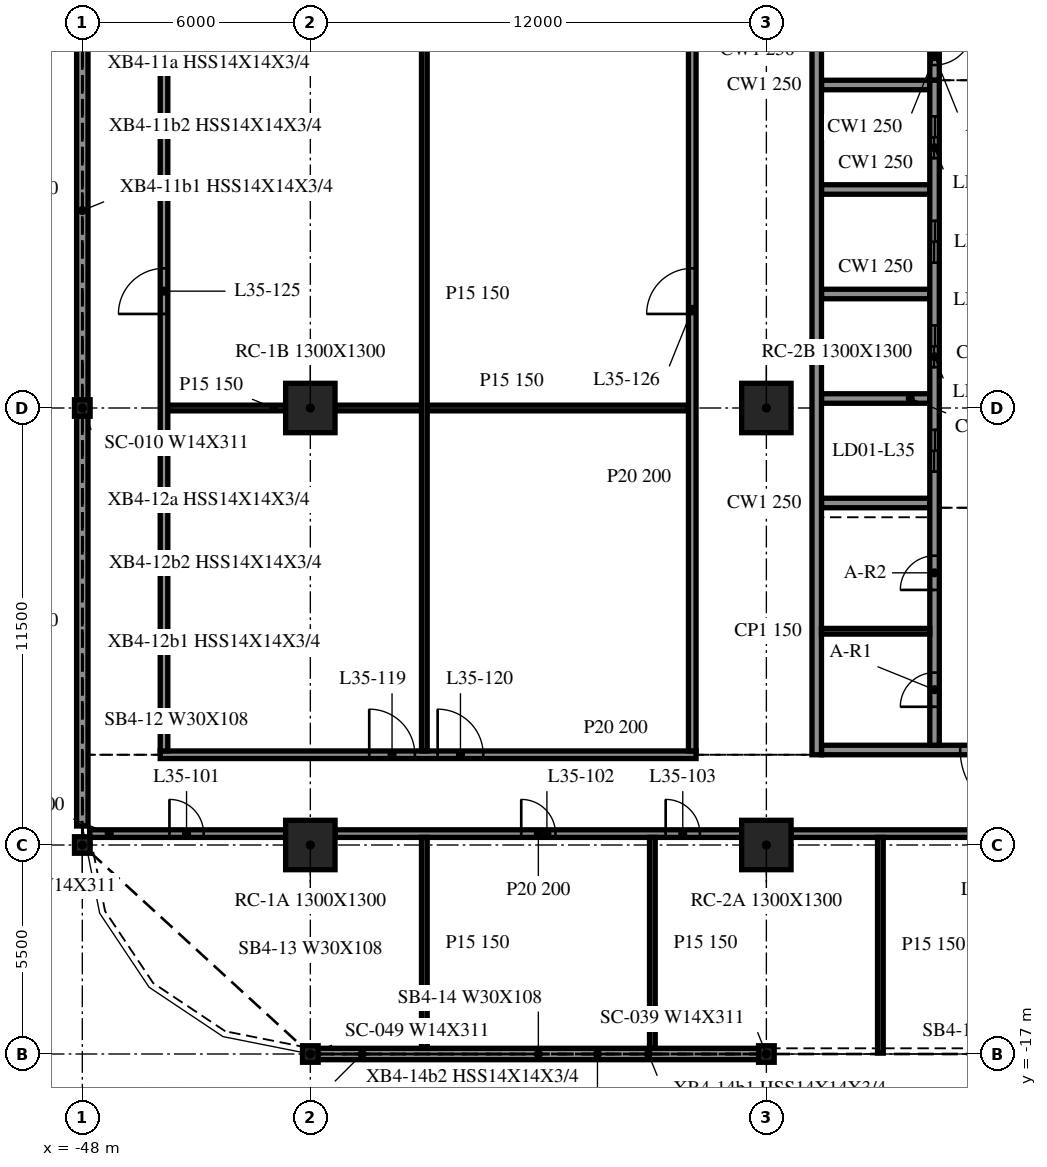
"""IFC4 building model, lengths in metres.
Left out: names, types, materials, properties, quantities, classifications, styles, units other than length and angle.
Written with IfcOpenShell. Run it as: python <this file> out.ifc"""

import sys

from ifc_helpers import new_model, si_unit, direction, frame, frame_2d, origin, origin_2d, place, context, subcontext, project, spatial, rectangle, i_section, extrude, element, fill, save


model = new_model("IFC4")
c1 = context("Model", 3, precision=1e-05, world=origin(), true_north=direction((0.0, 1.0)))
c2 = subcontext(c1, "Body", "Model", "MODEL_VIEW")
j1 = project(units=[si_unit("LENGTHUNIT", "METRE"), si_unit("PLANEANGLEUNIT", "RADIAN")], contexts=[c1])
p1 = place(None, origin())
s1 = spatial("IfcSite", under=j1, at=p1, CompositionType="ELEMENT")
p2 = place(p1, origin())
s2 = spatial("IfcBuilding", under=s1, at=p2, CompositionType="ELEMENT")
p3 = place(p2, frame((0.0, 0.0, 150.7)))
s3 = spatial("IfcBuildingStorey", under=s2, at=p3, CompositionType="ELEMENT", Elevation=150.7)
for number, where, z_axis, x_axis in (
    (1, (-42.0, -11.5, -0.34), (0.0, 0.0, 1.0), (1.0, 0.0, 0.0)),
    (2, (-42.0, 0.0, -0.34), (0.0, 0.0, 1.0), (1.0, 0.0, 0.0)),
    (3, (-30.0, -11.5, -0.34), (0.0, 0.0, 1.0), (1.0, 0.0, 0.0)),
    (4, (-30.0, 0.0, -0.34), (0.0, 0.0, 1.0), (1.0, 0.0, 0.0)),
):
    element("IfcColumn", number, at=place(p3, frame(where, z_axis=z_axis, x_axis=x_axis)), inside=s3, PredefinedType="COLUMN", context=c2, shape_type="SweptSolid", body=[
        extrude(rectangle(XDim=1.3, YDim=1.3, at=origin_2d()), origin(), (0.0, 0.0, 1.0), 3.89),
    ])
for number, where, z_axis, x_axis in (
    (5, (-48.0, 0.0, -0.34), (0.0, 0.0, 1.0), (1.0, 0.0, 0.0)),
    (6, (-48.0, -11.5, -0.34), (0.0, 0.0, 1.0), (1.0, 0.0, 0.0)),
    (7, (-42.0, -17.0, -0.34), (0.0, 0.0, 1.0), (1.0, 0.0, 0.0)),
    (8, (-30.0, -17.0, -0.34), (0.0, 0.0, 1.0), (1.0, 0.0, 0.0)),
):
    element("IfcColumn", number, at=place(p3, frame(where, z_axis=z_axis, x_axis=x_axis)), inside=s3, PredefinedType="COLUMN", context=c2, shape_type="SweptSolid", body=[
        extrude(i_section(OverallWidth=0.412, OverallDepth=0.434, WebThickness=0.036, FlangeThickness=0.057, at=origin_2d()), origin(), (0.0, 0.0, 1.0), 3.89),
    ])
p4 = place(p3, frame((-48.0, 11.282, 0.0), z_axis=(0.0, 0.0, 1.0), x_axis=(0.0, -1.0, 0.0)))
e9 = element("IfcWall", 9, at=p4, inside=s3, PredefinedType="NOTDEFINED", context=c2, shape_type="SweptSolid", body=[
    extrude(rectangle(XDim=11.064, YDim=0.3, at=frame_2d((5.532, 0.0))), origin(), (0.0, 0.0, 1.0), 3.55),
])
p5 = place(p3, frame((-48.0, -0.218, 0.0), z_axis=(0.0, 0.0, 1.0), x_axis=(0.0, -1.0, 0.0)))
e10 = element("IfcWall", 10, at=p5, inside=s3, PredefinedType="NOTDEFINED", context=c2, shape_type="SweptSolid", body=[
    extrude(rectangle(XDim=10.782, YDim=0.3, at=frame_2d((5.391, 0.0))), origin(), (0.0, 0.0, 1.0), 3.55),
])
p6 = place(p3, frame((-41.982, -17.0, 0.0), z_axis=(0.0, 0.0, 1.0), x_axis=(1.0, 0.0, 0.0)))
e11 = element("IfcWall", 11, at=p6, inside=s3, PredefinedType="NOTDEFINED", context=c2, shape_type="SweptSolid", body=[
    extrude(rectangle(XDim=11.964, YDim=0.3, at=frame_2d((5.982, 0.0))), origin(), (0.0, 0.0, 1.0), 3.55),
])
p7 = place(p3, frame((-28.675, 15.125, 0.0), z_axis=(0.0, 0.0, 1.0), x_axis=(0.0, -1.0, 0.0)))
e12 = element("IfcWall", 12, at=p7, inside=s3, PredefinedType="SOLIDWALL", context=c2, shape_type="SweptSolid", body=[
    extrude(rectangle(XDim=24.25, YDim=0.25, at=frame_2d((12.125, 0.0))), origin(), (0.0, 0.0, 1.0), 3.55),
])
p8 = place(p3, frame((-19.45, -9.0, 0.0), z_axis=(0.0, 0.0, 1.0), x_axis=(-1.0, 0.0, 0.0)))
e13 = element("IfcWall", 13, at=p8, inside=s3, PredefinedType="SOLIDWALL", context=c2, shape_type="SweptSolid", body=[
    extrude(rectangle(XDim=9.1, YDim=0.25, at=frame_2d((4.55, 0.0))), origin(), (0.0, 0.0, 1.0), 3.55),
])
p9 = place(p8, frame((3.65, 0.0, 0.0)))
e14 = element("IfcOpeningElement", 14, at=p9, cuts=e13, PredefinedType="OPENING", context=c2, shape_type="SweptSolid", body=[
    extrude(rectangle(XDim=1.8, YDim=2.1, at=frame_2d((0.9, 1.05))), frame((0.0, 0.135, 0.0), z_axis=(0.0, -1.0, 0.0), x_axis=(1.0, 0.0, 0.0)), (0.0, 0.0, 1.0), 0.27),
])
p10 = place(p3, frame((-25.575, -8.875, 0.0), z_axis=(0.0, 0.0, 1.0), x_axis=(0.0, 1.0, 0.0)))
e15 = element("IfcWall", 15, at=p10, inside=s3, PredefinedType="SOLIDWALL", context=c2, shape_type="SweptSolid", body=[
    extrude(rectangle(XDim=17.5, YDim=0.25, at=frame_2d((8.75, 0.0))), origin(), (0.0, 0.0, 1.0), 3.55),
])
p11 = place(p10, frame((7.2, 0.0, 0.0)))
e16 = element("IfcOpeningElement", 16, at=p11, cuts=e15, PredefinedType="OPENING", context=c2, shape_type="SweptSolid", body=[
    extrude(rectangle(XDim=1.1, YDim=2.1, at=frame_2d((0.55, 1.05))), frame((0.0, 0.135, 0.0), z_axis=(0.0, -1.0, 0.0), x_axis=(1.0, 0.0, 0.0)), (0.0, 0.0, 1.0), 0.27),
])
p12 = place(p10, frame((9.95, 0.0, 0.0)))
e17 = element("IfcOpeningElement", 17, at=p12, cuts=e15, PredefinedType="OPENING", context=c2, shape_type="SweptSolid", body=[
    extrude(rectangle(XDim=1.1, YDim=2.1, at=frame_2d((0.55, 1.05))), frame((0.0, 0.135, 0.0), z_axis=(0.0, -1.0, 0.0), x_axis=(1.0, 0.0, 0.0)), (0.0, 0.0, 1.0), 0.27),
])
p13 = place(p10, frame((12.7, 0.0, 0.0)))
e18 = element("IfcOpeningElement", 18, at=p13, cuts=e15, PredefinedType="OPENING", context=c2, shape_type="SweptSolid", body=[
    extrude(rectangle(XDim=1.1, YDim=2.1, at=frame_2d((0.55, 1.05))), frame((0.0, 0.135, 0.0), z_axis=(0.0, -1.0, 0.0), x_axis=(1.0, 0.0, 0.0)), (0.0, 0.0, 1.0), 0.27),
])
p14 = place(p10, frame((15.45, 0.0, 0.0)))
e19 = element("IfcOpeningElement", 19, at=p14, cuts=e15, PredefinedType="OPENING", context=c2, shape_type="SweptSolid", body=[
    extrude(rectangle(XDim=1.1, YDim=2.1, at=frame_2d((0.55, 1.05))), frame((0.0, 0.135, 0.0), z_axis=(0.0, -1.0, 0.0), x_axis=(1.0, 0.0, 0.0)), (0.0, 0.0, 1.0), 0.27),
])
p15 = place(p10, frame((1.012, 0.0, 0.0)))
e20 = element("IfcOpeningElement", 20, at=p15, cuts=e15, PredefinedType="OPENING", context=c2, shape_type="SweptSolid", body=[
    extrude(rectangle(XDim=0.9, YDim=2.1, at=frame_2d((0.45, 1.05))), frame((0.0, 0.135, 0.0), z_axis=(0.0, -1.0, 0.0), x_axis=(1.0, 0.0, 0.0)), (0.0, 0.0, 1.0), 0.27),
])
p16 = place(p10, frame((4.087, 0.0, 0.0)))
e21 = element("IfcOpeningElement", 21, at=p16, cuts=e15, PredefinedType="OPENING", context=c2, shape_type="SweptSolid", body=[
    extrude(rectangle(XDim=0.9, YDim=2.1, at=frame_2d((0.45, 1.05))), frame((0.0, 0.135, 0.0), z_axis=(0.0, -1.0, 0.0), x_axis=(1.0, 0.0, 0.0)), (0.0, 0.0, 1.0), 0.27),
])
p17 = place(p3, frame((-25.575, 14.875, 0.0), z_axis=(0.0, 0.0, 1.0), x_axis=(0.0, -1.0, 0.0)))
e22 = element("IfcWall", 22, at=p17, inside=s3, PredefinedType="SOLIDWALL", context=c2, shape_type="SweptSolid", body=[
    extrude(rectangle(XDim=6.25, YDim=0.25, at=frame_2d((3.125, 0.0))), origin(), (0.0, 0.0, 1.0), 3.55),
])
p18 = place(p17, frame((4.85, 0.0, 0.0)))
e23 = element("IfcOpeningElement", 23, at=p18, cuts=e22, PredefinedType="OPENING", context=c2, shape_type="SweptSolid", body=[
    extrude(rectangle(XDim=1.0, YDim=2.1, at=frame_2d((0.5, 1.05))), frame((0.0, 0.135, 0.0), z_axis=(0.0, -1.0, 0.0), x_axis=(1.0, 0.0, 0.0)), (0.0, 0.0, 1.0), 0.27),
])
for number, where, z_axis, x_axis in (
    (24, (-28.55, -2.5, 0.0), (0.0, 0.0, 1.0), (1.0, 0.0, 0.0)),
    (25, (-28.55, 0.25, 0.0), (0.0, 0.0, 1.0), (1.0, 0.0, 0.0)),
    (26, (-28.55, 3.0, 0.0), (0.0, 0.0, 1.0), (1.0, 0.0, 0.0)),
    (27, (-28.55, 5.75, 0.0), (0.0, 0.0, 1.0), (1.0, 0.0, 0.0)),
    (28, (-28.55, 8.5, 0.0), (0.0, 0.0, 1.0), (1.0, 0.0, 0.0)),
):
    element("IfcWall", number, at=place(p3, frame(where, z_axis=z_axis, x_axis=x_axis)), inside=s3, PredefinedType="SOLIDWALL", context=c2, shape_type="SweptSolid", body=[
        extrude(rectangle(XDim=2.85, YDim=0.25, at=frame_2d((1.425, 0.0))), origin(), (0.0, 0.0, 1.0), 3.55),
    ])
p19 = place(p3, frame((-28.55, -5.875, 0.0), z_axis=(0.0, 0.0, 1.0), x_axis=(1.0, 0.0, 0.0)))
e29 = element("IfcWall", 29, at=p19, inside=s3, PredefinedType="PARTITIONING", context=c2, shape_type="SweptSolid", body=[
    extrude(rectangle(XDim=2.85, YDim=0.15, at=frame_2d((1.425, 0.0))), origin(), (0.0, 0.0, 1.0), 3.55),
])
p20 = place(p3, frame((-47.807, -11.2, 0.0), z_axis=(0.0, 0.0, 1.0), x_axis=(1.0, 0.0, 0.0)))
e30 = element("IfcWall", 30, at=p20, inside=s3, PredefinedType="PARTITIONING", context=c2, shape_type="SweptSolid", body=[
    extrude(rectangle(XDim=5.157, YDim=0.2, at=frame_2d((2.579, 0.0))), origin(), (0.0, 0.0, 1.0), 3.55),
])
p21 = place(p20, frame((2.1, 0.0, 0.0)))
e31 = element("IfcOpeningElement", 31, at=p21, cuts=e30, PredefinedType="OPENING", context=c2, shape_type="SweptSolid", body=[
    extrude(rectangle(XDim=0.9, YDim=2.1, at=frame_2d((0.45, 1.05))), frame((0.0, 0.11, 0.0), z_axis=(0.0, -1.0, 0.0), x_axis=(1.0, 0.0, 0.0)), (0.0, 0.0, 1.0), 0.22),
])
p22 = place(p3, frame((-41.35, -11.2, 0.0), z_axis=(0.0, 0.0, 1.0), x_axis=(1.0, 0.0, 0.0)))
e32 = element("IfcWall", 32, at=p22, inside=s3, PredefinedType="PARTITIONING", context=c2, shape_type="SweptSolid", body=[
    extrude(rectangle(XDim=10.7, YDim=0.2, at=frame_2d((5.35, 0.0))), origin(), (0.0, 0.0, 1.0), 3.55),
])
p23 = place(p22, frame((4.9, 0.0, 0.0)))
e33 = element("IfcOpeningElement", 33, at=p23, cuts=e32, PredefinedType="OPENING", context=c2, shape_type="SweptSolid", body=[
    extrude(rectangle(XDim=0.9, YDim=2.1, at=frame_2d((0.45, 1.05))), frame((0.0, 0.11, 0.0), z_axis=(0.0, -1.0, 0.0), x_axis=(1.0, 0.0, 0.0)), (0.0, 0.0, 1.0), 0.22),
])
p24 = place(p22, frame((8.7, 0.0, 0.0)))
e34 = element("IfcOpeningElement", 34, at=p24, cuts=e32, PredefinedType="OPENING", context=c2, shape_type="SweptSolid", body=[
    extrude(rectangle(XDim=0.9, YDim=2.1, at=frame_2d((0.45, 1.05))), frame((0.0, 0.11, 0.0), z_axis=(0.0, -1.0, 0.0), x_axis=(1.0, 0.0, 0.0)), (0.0, 0.0, 1.0), 0.22),
])
p25 = place(p3, frame((-29.35, -11.2, 0.0), z_axis=(0.0, 0.0, 1.0), x_axis=(1.0, 0.0, 0.0)))
e35 = element("IfcWall", 35, at=p25, inside=s3, PredefinedType="PARTITIONING", context=c2, shape_type="SweptSolid", body=[
    extrude(rectangle(XDim=10.7, YDim=0.2, at=frame_2d((5.35, 0.0))), origin(), (0.0, 0.0, 1.0), 3.55),
])
p26 = place(p25, frame((4.9, 0.0, 0.0)))
e36 = element("IfcOpeningElement", 36, at=p26, cuts=e35, PredefinedType="OPENING", context=c2, shape_type="SweptSolid", body=[
    extrude(rectangle(XDim=0.9, YDim=2.1, at=frame_2d((0.45, 1.05))), frame((0.0, 0.11, 0.0), z_axis=(0.0, -1.0, 0.0), x_axis=(1.0, 0.0, 0.0)), (0.0, 0.0, 1.0), 0.22),
])
p27 = place(p3, frame((-45.95, -9.125, 0.0), z_axis=(0.0, 0.0, 1.0), x_axis=(1.0, 0.0, 0.0)))
e37 = element("IfcWall", 37, at=p27, inside=s3, PredefinedType="PARTITIONING", context=c2, shape_type="SweptSolid", body=[
    extrude(rectangle(XDim=14.1, YDim=0.2, at=frame_2d((7.05, 0.0))), origin(), (0.0, 0.0, 1.0), 3.55),
])
p28 = place(p27, frame((5.5, 0.0, 0.0)))
e38 = element("IfcOpeningElement", 38, at=p28, cuts=e37, PredefinedType="OPENING", context=c2, shape_type="SweptSolid", body=[
    extrude(rectangle(XDim=1.2, YDim=2.1, at=frame_2d((0.6, 1.05))), frame((0.0, 0.11, 0.0), z_axis=(0.0, -1.0, 0.0), x_axis=(1.0, 0.0, 0.0)), (0.0, 0.0, 1.0), 0.22),
])
p29 = place(p27, frame((7.3, 0.0, 0.0)))
e39 = element("IfcOpeningElement", 39, at=p29, cuts=e37, PredefinedType="OPENING", context=c2, shape_type="SweptSolid", body=[
    extrude(rectangle(XDim=1.2, YDim=2.1, at=frame_2d((0.6, 1.05))), frame((0.0, 0.11, 0.0), z_axis=(0.0, -1.0, 0.0), x_axis=(1.0, 0.0, 0.0)), (0.0, 0.0, 1.0), 0.22),
])
p30 = place(p3, frame((-45.75, 0.0, 0.0), z_axis=(0.0, 0.0, 1.0), x_axis=(1.0, 0.0, 0.0)))
e40 = element("IfcWall", 40, at=p30, inside=s3, PredefinedType="PARTITIONING", context=c2, shape_type="SweptSolid", body=[
    extrude(rectangle(XDim=3.1, YDim=0.15, at=frame_2d((1.55, 0.0))), origin(), (0.0, 0.0, 1.0), 3.55),
])
p31 = place(p3, frame((-41.35, 0.0, 0.0), z_axis=(0.0, 0.0, 1.0), x_axis=(1.0, 0.0, 0.0)))
e41 = element("IfcWall", 41, at=p31, inside=s3, PredefinedType="PARTITIONING", context=c2, shape_type="SweptSolid", body=[
    extrude(rectangle(XDim=9.3, YDim=0.15, at=frame_2d((4.65, 0.0))), origin(), (0.0, 0.0, 1.0), 3.55),
])
p32 = place(p3, frame((-45.85, -9.025, 0.0), z_axis=(0.0, 0.0, 1.0), x_axis=(0.0, 1.0, 0.0)))
e42 = element("IfcWall", 42, at=p32, inside=s3, PredefinedType="PARTITIONING", context=c2, shape_type="SweptSolid", body=[
    extrude(rectangle(XDim=24.05, YDim=0.2, at=frame_2d((12.025, 0.0))), origin(), (0.0, 0.0, 1.0), 3.55),
])
p33 = place(p32, frame((11.5, 0.0, 0.0)))
e43 = element("IfcOpeningElement", 43, at=p33, cuts=e42, PredefinedType="OPENING", context=c2, shape_type="SweptSolid", body=[
    extrude(rectangle(XDim=1.2, YDim=2.1, at=frame_2d((0.6, 1.05))), frame((0.0, 0.11, 0.0), z_axis=(0.0, -1.0, 0.0), x_axis=(1.0, 0.0, 0.0)), (0.0, 0.0, 1.0), 0.22),
])
p34 = place(p3, frame((-39.0, -16.85, 0.0), z_axis=(0.0, 0.0, 1.0), x_axis=(0.0, 1.0, 0.0)))
e44 = element("IfcWall", 44, at=p34, inside=s3, PredefinedType="PARTITIONING", context=c2, shape_type="SweptSolid", body=[
    extrude(rectangle(XDim=5.55, YDim=0.15, at=frame_2d((2.775, 0.0))), origin(), (0.0, 0.0, 1.0), 3.55),
])
p35 = place(p3, frame((-39.0, -9.025, 0.0), z_axis=(0.0, 0.0, 1.0), x_axis=(0.0, 1.0, 0.0)))
e45 = element("IfcWall", 45, at=p35, inside=s3, PredefinedType="PARTITIONING", context=c2, shape_type="SweptSolid", body=[
    extrude(rectangle(XDim=24.05, YDim=0.15, at=frame_2d((12.025, 0.0))), origin(), (0.0, 0.0, 1.0), 3.55),
])
p36 = place(p3, frame((-33.0, -16.85, 0.0), z_axis=(0.0, 0.0, 1.0), x_axis=(0.0, 1.0, 0.0)))
e46 = element("IfcWall", 46, at=p36, inside=s3, PredefinedType="PARTITIONING", context=c2, shape_type="SweptSolid", body=[
    extrude(rectangle(XDim=5.55, YDim=0.15, at=frame_2d((2.775, 0.0))), origin(), (0.0, 0.0, 1.0), 3.55),
])
p37 = place(p3, frame((-31.95, -9.025, 0.0), z_axis=(0.0, 0.0, 1.0), x_axis=(0.0, 1.0, 0.0)))
e47 = element("IfcWall", 47, at=p37, inside=s3, PredefinedType="PARTITIONING", context=c2, shape_type="SweptSolid", body=[
    extrude(rectangle(XDim=24.05, YDim=0.2, at=frame_2d((12.025, 0.0))), origin(), (0.0, 0.0, 1.0), 3.55),
])
p38 = place(p37, frame((11.5, 0.0, 0.0)))
e48 = element("IfcOpeningElement", 48, at=p38, cuts=e47, PredefinedType="OPENING", context=c2, shape_type="SweptSolid", body=[
    extrude(rectangle(XDim=1.2, YDim=2.1, at=frame_2d((0.6, 1.05))), frame((0.0, 0.11, 0.0), z_axis=(0.0, -1.0, 0.0), x_axis=(1.0, 0.0, 0.0)), (0.0, 0.0, 1.0), 0.22),
])
p39 = place(p3, frame((-27.0, -16.975, 0.0), z_axis=(0.0, 0.0, 1.0), x_axis=(0.0, 1.0, 0.0)))
e49 = element("IfcWall", 49, at=p39, inside=s3, PredefinedType="PARTITIONING", context=c2, shape_type="SweptSolid", body=[
    extrude(rectangle(XDim=5.675, YDim=0.15, at=frame_2d((2.837, 0.0))), origin(), (0.0, 0.0, 1.0), 3.55),
])
p40 = place(p9, origin())
e50 = element("IfcDoor", 50, at=p40, inside=s3, OperationType="DOUBLE_DOOR_SINGLE_SWING", PredefinedType="DOOR", context=c2, shape_type="SweptSolid", body=[
    extrude(rectangle(XDim=1.8, YDim=2.1, at=frame_2d((0.9, 1.05))), frame((0.0, 0.025, 0.0), z_axis=(0.0, -1.0, 0.0), x_axis=(1.0, 0.0, 0.0)), (0.0, 0.0, 1.0), 0.05),
])
fill(e14, e50)
p41 = place(p11, origin())
e51 = element("IfcDoor", 51, at=p41, inside=s3, OperationType="DOUBLE_DOOR_SLIDING", PredefinedType="DOOR", context=c2, shape_type="SweptSolid", body=[
    extrude(rectangle(XDim=1.1, YDim=2.1, at=frame_2d((0.55, 1.05))), frame((0.0, 0.025, 0.0), z_axis=(0.0, -1.0, 0.0), x_axis=(1.0, 0.0, 0.0)), (0.0, 0.0, 1.0), 0.05),
])
fill(e16, e51)
p42 = place(p12, origin())
e52 = element("IfcDoor", 52, at=p42, inside=s3, OperationType="DOUBLE_DOOR_SLIDING", PredefinedType="DOOR", context=c2, shape_type="SweptSolid", body=[
    extrude(rectangle(XDim=1.1, YDim=2.1, at=frame_2d((0.55, 1.05))), frame((0.0, 0.025, 0.0), z_axis=(0.0, -1.0, 0.0), x_axis=(1.0, 0.0, 0.0)), (0.0, 0.0, 1.0), 0.05),
])
fill(e17, e52)
p43 = place(p13, origin())
e53 = element("IfcDoor", 53, at=p43, inside=s3, OperationType="DOUBLE_DOOR_SLIDING", PredefinedType="DOOR", context=c2, shape_type="SweptSolid", body=[
    extrude(rectangle(XDim=1.1, YDim=2.1, at=frame_2d((0.55, 1.05))), frame((0.0, 0.025, 0.0), z_axis=(0.0, -1.0, 0.0), x_axis=(1.0, 0.0, 0.0)), (0.0, 0.0, 1.0), 0.05),
])
fill(e18, e53)
p44 = place(p14, origin())
e54 = element("IfcDoor", 54, at=p44, inside=s3, OperationType="DOUBLE_DOOR_SLIDING", PredefinedType="DOOR", context=c2, shape_type="SweptSolid", body=[
    extrude(rectangle(XDim=1.1, YDim=2.1, at=frame_2d((0.55, 1.05))), frame((0.0, 0.025, 0.0), z_axis=(0.0, -1.0, 0.0), x_axis=(1.0, 0.0, 0.0)), (0.0, 0.0, 1.0), 0.05),
])
fill(e19, e54)
p45 = place(p15, origin())
e55 = element("IfcDoor", 55, at=p45, inside=s3, OperationType="SINGLE_SWING_LEFT", PredefinedType="DOOR", context=c2, shape_type="SweptSolid", body=[
    extrude(rectangle(XDim=0.9, YDim=2.1, at=frame_2d((0.45, 1.05))), frame((0.0, 0.025, 0.0), z_axis=(0.0, -1.0, 0.0), x_axis=(1.0, 0.0, 0.0)), (0.0, 0.0, 1.0), 0.05),
])
fill(e20, e55)
p46 = place(p16, origin())
e56 = element("IfcDoor", 56, at=p46, inside=s3, OperationType="SINGLE_SWING_RIGHT", PredefinedType="DOOR", context=c2, shape_type="SweptSolid", body=[
    extrude(rectangle(XDim=0.9, YDim=2.1, at=frame_2d((0.45, 1.05))), frame((0.0, 0.025, 0.0), z_axis=(0.0, -1.0, 0.0), x_axis=(1.0, 0.0, 0.0)), (0.0, 0.0, 1.0), 0.05),
])
fill(e21, e56)
p47 = place(p18, origin())
e57 = element("IfcDoor", 57, at=p47, inside=s3, OperationType="SINGLE_SWING_RIGHT", PredefinedType="DOOR", context=c2, shape_type="SweptSolid", body=[
    extrude(rectangle(XDim=1.0, YDim=2.1, at=frame_2d((0.5, 1.05))), frame((0.0, 0.025, 0.0), z_axis=(0.0, -1.0, 0.0), x_axis=(1.0, 0.0, 0.0)), (0.0, 0.0, 1.0), 0.05),
])
fill(e23, e57)
p48 = place(p21, origin())
e58 = element("IfcDoor", 58, at=p48, inside=s3, OperationType="SINGLE_SWING_RIGHT", PredefinedType="DOOR", context=c2, shape_type="SweptSolid", body=[
    extrude(rectangle(XDim=0.9, YDim=2.1, at=frame_2d((0.45, 1.05))), frame((0.0, 0.025, 0.0), z_axis=(0.0, -1.0, 0.0), x_axis=(1.0, 0.0, 0.0)), (0.0, 0.0, 1.0), 0.05),
])
fill(e31, e58)
p49 = place(p23, origin())
e59 = element("IfcDoor", 59, at=p49, inside=s3, OperationType="SINGLE_SWING_RIGHT", PredefinedType="DOOR", context=c2, shape_type="SweptSolid", body=[
    extrude(rectangle(XDim=0.9, YDim=2.1, at=frame_2d((0.45, 1.05))), frame((0.0, 0.025, 0.0), z_axis=(0.0, -1.0, 0.0), x_axis=(1.0, 0.0, 0.0)), (0.0, 0.0, 1.0), 0.05),
])
fill(e33, e59)
p50 = place(p24, origin())
e60 = element("IfcDoor", 60, at=p50, inside=s3, OperationType="SINGLE_SWING_LEFT", PredefinedType="DOOR", context=c2, shape_type="SweptSolid", body=[
    extrude(rectangle(XDim=0.9, YDim=2.1, at=frame_2d((0.45, 1.05))), frame((0.0, 0.025, 0.0), z_axis=(0.0, -1.0, 0.0), x_axis=(1.0, 0.0, 0.0)), (0.0, 0.0, 1.0), 0.05),
])
fill(e34, e60)
p51 = place(p28, origin())
e61 = element("IfcDoor", 61, at=p51, inside=s3, OperationType="SINGLE_SWING_LEFT", PredefinedType="DOOR", context=c2, shape_type="SweptSolid", body=[
    extrude(rectangle(XDim=1.2, YDim=2.1, at=frame_2d((0.6, 1.05))), frame((0.0, 0.025, 0.0), z_axis=(0.0, -1.0, 0.0), x_axis=(1.0, 0.0, 0.0)), (0.0, 0.0, 1.0), 0.05),
])
fill(e38, e61)
p52 = place(p29, origin())
e62 = element("IfcDoor", 62, at=p52, inside=s3, OperationType="SINGLE_SWING_RIGHT", PredefinedType="DOOR", context=c2, shape_type="SweptSolid", body=[
    extrude(rectangle(XDim=1.2, YDim=2.1, at=frame_2d((0.6, 1.05))), frame((0.0, 0.025, 0.0), z_axis=(0.0, -1.0, 0.0), x_axis=(1.0, 0.0, 0.0)), (0.0, 0.0, 1.0), 0.05),
])
fill(e39, e62)
p53 = place(p33, origin())
e63 = element("IfcDoor", 63, at=p53, inside=s3, OperationType="SINGLE_SWING_LEFT", PredefinedType="DOOR", context=c2, shape_type="SweptSolid", body=[
    extrude(rectangle(XDim=1.2, YDim=2.1, at=frame_2d((0.6, 1.05))), frame((0.0, 0.025, 0.0), z_axis=(0.0, -1.0, 0.0), x_axis=(1.0, 0.0, 0.0)), (0.0, 0.0, 1.0), 0.05),
])
fill(e43, e63)
p54 = place(p38, origin())
e64 = element("IfcDoor", 64, at=p54, inside=s3, OperationType="SINGLE_SWING_RIGHT", PredefinedType="DOOR", context=c2, shape_type="SweptSolid", body=[
    extrude(rectangle(XDim=1.2, YDim=2.1, at=frame_2d((0.6, 1.05))), frame((0.0, 0.025, 0.0), z_axis=(0.0, -1.0, 0.0), x_axis=(1.0, 0.0, 0.0)), (0.0, 0.0, 1.0), 0.05),
])
fill(e48, e64)
save(model, sys.argv[1])
